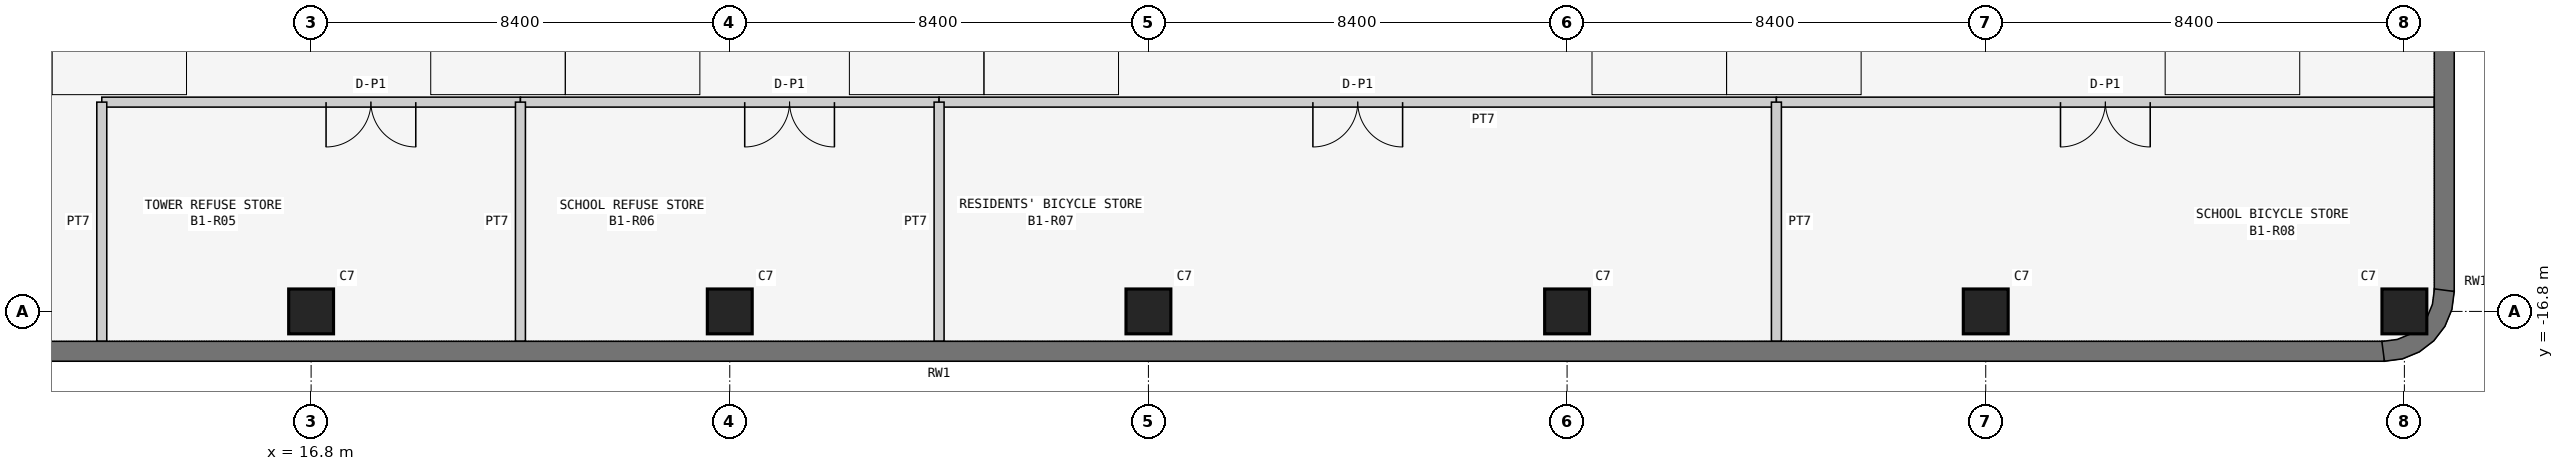
"""IFC4 building model, lengths in metres.
Left out: names, types, materials, properties, quantities, classifications, styles, units other than length and angle.
Written with IfcOpenShell. Run it as: python <this file> out.ifc"""

import sys

from ifc_helpers import new_model, si_unit, direction, frame, frame_2d, origin, origin_2d, place, context, subcontext, project, spatial, polyline, rectangle, outline, extrude, element, fill, save


model = new_model("IFC4")
c1 = context("Model", 3, precision=1e-05, world=origin(), true_north=direction((0.0, 1.0)))
c2 = subcontext(c1, "Body", "Model", "MODEL_VIEW")
j1 = project(units=[si_unit("LENGTHUNIT", "METRE"), si_unit("PLANEANGLEUNIT", "RADIAN")], contexts=[c1])
p1 = place(None, origin())
s1 = spatial("IfcSite", under=j1, at=p1, CompositionType="ELEMENT")
p2 = place(p1, origin())
s2 = spatial("IfcBuilding", under=s1, at=p2, CompositionType="ELEMENT")
p3 = place(p2, frame((0.0, 0.0, -3.6)))
s3 = spatial("IfcBuildingStorey", under=s2, at=p3, CompositionType="ELEMENT", Elevation=-3.6)
for number, where, z_axis, x_axis in (
    (1, (16.8, -16.8, 0.0), (0.0, 0.0, 1.0), (1.0, 0.0, 0.0)),
    (2, (25.2, -16.8, 0.0), (0.0, 0.0, 1.0), (1.0, 0.0, 0.0)),
    (3, (33.6, -16.8, 0.0), (0.0, 0.0, 1.0), (1.0, 0.0, 0.0)),
    (4, (42.0, -16.8, 0.0), (0.0, 0.0, 1.0), (1.0, 0.0, 0.0)),
    (5, (50.4, -16.8, 0.0), (0.0, 0.0, 1.0), (1.0, 0.0, 0.0)),
    (6, (58.8, -16.8, 0.0), (0.0, 0.0, 1.0), (1.0, 0.0, 0.0)),
):
    element("IfcColumn", number, at=place(p3, frame(where, z_axis=z_axis, x_axis=x_axis)), inside=s3, PredefinedType="COLUMN", context=c2, shape_type="SweptSolid", body=[
        extrude(rectangle(XDim=0.9, YDim=0.9, at=origin_2d()), origin(), (0.0, 0.0, 1.0), 3.6),
    ])
p4 = place(p3, frame((59.6, -16.4, 0.0), z_axis=(0.0, 0.0, 1.0), x_axis=(0.0, 1.0, 0.0)))
e7 = element("IfcWall", 7, at=p4, inside=s3, PredefinedType="SOLIDWALL", context=c2, shape_type="SweptSolid", body=[
    extrude(rectangle(XDim=74.8, YDim=0.4, at=frame_2d((37.4, 0.0))), origin(), (0.0, 0.0, 1.0), 3.6),
])
p5 = place(p3, frame((0.4, -17.6, 0.0), z_axis=(0.0, 0.0, 1.0), x_axis=(1.0, 0.0, 0.0)))
e8 = element("IfcWall", 8, at=p5, inside=s3, PredefinedType="SOLIDWALL", context=c2, shape_type="SweptSolid", body=[
    extrude(rectangle(XDim=58.0, YDim=0.4, at=frame_2d((29.0, 0.0))), origin(), (0.0, 0.0, 1.0), 3.6),
])
p6 = place(p3, origin())
e9 = element("IfcWall", 9, at=p6, inside=s3, PredefinedType="SOLIDWALL", context=c2, shape_type="SweptSolid", body=[
    extrude(outline(polyline([(59.8, -16.4), (59.4, -16.347), (59.4, -16.374), (59.363, -16.658), (59.263, -16.898), (59.104, -17.104), (58.898, -17.263), (58.658, -17.363), (58.374, -17.4), (58.347, -17.4), (58.4, -17.8), (58.762, -17.752), (59.1, -17.612), (59.39, -17.39), (59.612, -17.1), (59.752, -16.762), (59.8, -16.4)])), origin(), (0.0, 0.0, 1.0), 3.6),
])
p7 = place(p3, frame((21.0, -12.6, 0.0), z_axis=(0.0, 0.0, 1.0), x_axis=(-1.0, 0.0, 0.0)))
e10 = element("IfcWall", 10, at=p7, inside=s3, PredefinedType="PARTITIONING", context=c2, shape_type="SweptSolid", body=[
    extrude(rectangle(XDim=8.4, YDim=0.2, at=frame_2d((4.2, 0.0))), origin(), (0.0, 0.0, 1.0), 3.3),
])
p8 = place(p7, frame((2.1, 0.0, 0.0)))
e11 = element("IfcOpeningElement", 11, at=p8, cuts=e10, PredefinedType="OPENING", context=c2, shape_type="SweptSolid", body=[
    extrude(rectangle(XDim=1.8, YDim=2.4, at=frame_2d((0.9, 1.2))), frame((0.0, 0.11, 0.0), z_axis=(0.0, -1.0, 0.0), x_axis=(1.0, 0.0, 0.0)), (0.0, 0.0, 1.0), 0.22),
])
p9 = place(p3, frame((12.6, -12.6, 0.0), z_axis=(0.0, 0.0, 1.0), x_axis=(0.0, -1.0, 0.0)))
e12 = element("IfcWall", 12, at=p9, inside=s3, PredefinedType="PARTITIONING", context=c2, shape_type="SweptSolid", body=[
    extrude(rectangle(XDim=4.8, YDim=0.2, at=frame_2d((2.4, 0.0))), origin(), (0.0, 0.0, 1.0), 2.688),
])
p10 = place(p3, frame((29.4, -12.6, 0.0), z_axis=(0.0, 0.0, 1.0), x_axis=(-1.0, 0.0, 0.0)))
e13 = element("IfcWall", 13, at=p10, inside=s3, PredefinedType="PARTITIONING", context=c2, shape_type="SweptSolid", body=[
    extrude(rectangle(XDim=8.4, YDim=0.2, at=frame_2d((4.2, 0.0))), origin(), (0.0, 0.0, 1.0), 3.3),
])
p11 = place(p10, frame((2.1, 0.0, 0.0)))
e14 = element("IfcOpeningElement", 14, at=p11, cuts=e13, PredefinedType="OPENING", context=c2, shape_type="SweptSolid", body=[
    extrude(rectangle(XDim=1.8, YDim=2.4, at=frame_2d((0.9, 1.2))), frame((0.0, 0.11, 0.0), z_axis=(0.0, -1.0, 0.0), x_axis=(1.0, 0.0, 0.0)), (0.0, 0.0, 1.0), 0.22),
])
p12 = place(p3, frame((46.2, -12.6, 0.0), z_axis=(0.0, 0.0, 1.0), x_axis=(-1.0, 0.0, 0.0)))
e15 = element("IfcWall", 15, at=p12, inside=s3, PredefinedType="PARTITIONING", context=c2, shape_type="SweptSolid", body=[
    extrude(rectangle(XDim=16.8, YDim=0.2, at=frame_2d((8.4, 0.0))), origin(), (0.0, 0.0, 1.0), 3.3),
])
p13 = place(p12, frame((7.5, 0.0, 0.0)))
e16 = element("IfcOpeningElement", 16, at=p13, cuts=e15, PredefinedType="OPENING", context=c2, shape_type="SweptSolid", body=[
    extrude(rectangle(XDim=1.8, YDim=2.4, at=frame_2d((0.9, 1.2))), frame((0.0, 0.11, 0.0), z_axis=(0.0, -1.0, 0.0), x_axis=(1.0, 0.0, 0.0)), (0.0, 0.0, 1.0), 0.22),
])
p14 = place(p3, frame((59.4, -12.6, 0.0), z_axis=(0.0, 0.0, 1.0), x_axis=(-1.0, 0.0, 0.0)))
e17 = element("IfcWall", 17, at=p14, inside=s3, PredefinedType="PARTITIONING", context=c2, shape_type="SweptSolid", body=[
    extrude(rectangle(XDim=13.2, YDim=0.2, at=frame_2d((6.6, 0.0))), origin(), (0.0, 0.0, 1.0), 3.3),
])
p15 = place(p14, frame((5.7, 0.0, 0.0)))
e18 = element("IfcOpeningElement", 18, at=p15, cuts=e17, PredefinedType="OPENING", context=c2, shape_type="SweptSolid", body=[
    extrude(rectangle(XDim=1.8, YDim=2.4, at=frame_2d((0.9, 1.2))), frame((0.0, 0.11, 0.0), z_axis=(0.0, -1.0, 0.0), x_axis=(1.0, 0.0, 0.0)), (0.0, 0.0, 1.0), 0.22),
])
for number, where, z_axis, x_axis in (
    (19, (21.0, -12.6, 0.0), (0.0, 0.0, 1.0), (0.0, -1.0, 0.0)),
    (20, (29.4, -12.6, 0.0), (0.0, 0.0, 1.0), (0.0, -1.0, 0.0)),
    (21, (46.2, -12.6, 0.0), (0.0, 0.0, 1.0), (0.0, -1.0, 0.0)),
):
    element("IfcWall", number, at=place(p3, frame(where, z_axis=z_axis, x_axis=x_axis)), inside=s3, PredefinedType="PARTITIONING", context=c2, shape_type="SweptSolid", body=[
        extrude(rectangle(XDim=4.8, YDim=0.2, at=frame_2d((2.4, 0.0))), origin(), (0.0, 0.0, 1.0), 2.688),
    ])
p16 = place(p8, origin())
e22 = element("IfcDoor", 22, at=p16, inside=s3, OperationType="DOUBLE_DOOR_SINGLE_SWING", PredefinedType="DOOR", context=c2, shape_type="SweptSolid", body=[
    extrude(rectangle(XDim=1.8, YDim=2.4, at=frame_2d((0.9, 1.2))), frame((0.0, 0.025, 0.0), z_axis=(0.0, -1.0, 0.0), x_axis=(1.0, 0.0, 0.0)), (0.0, 0.0, 1.0), 0.05),
])
fill(e11, e22)
p17 = place(p11, origin())
e23 = element("IfcDoor", 23, at=p17, inside=s3, OperationType="DOUBLE_DOOR_SINGLE_SWING", PredefinedType="DOOR", context=c2, shape_type="SweptSolid", body=[
    extrude(rectangle(XDim=1.8, YDim=2.4, at=frame_2d((0.9, 1.2))), frame((0.0, 0.025, 0.0), z_axis=(0.0, -1.0, 0.0), x_axis=(1.0, 0.0, 0.0)), (0.0, 0.0, 1.0), 0.05),
])
fill(e14, e23)
p18 = place(p13, origin())
e24 = element("IfcDoor", 24, at=p18, inside=s3, OperationType="DOUBLE_DOOR_SINGLE_SWING", PredefinedType="DOOR", context=c2, shape_type="SweptSolid", body=[
    extrude(rectangle(XDim=1.8, YDim=2.4, at=frame_2d((0.9, 1.2))), frame((0.0, 0.025, 0.0), z_axis=(0.0, -1.0, 0.0), x_axis=(1.0, 0.0, 0.0)), (0.0, 0.0, 1.0), 0.05),
])
fill(e16, e24)
p19 = place(p15, origin())
e25 = element("IfcDoor", 25, at=p19, inside=s3, OperationType="DOUBLE_DOOR_SINGLE_SWING", PredefinedType="DOOR", context=c2, shape_type="SweptSolid", body=[
    extrude(rectangle(XDim=1.8, YDim=2.4, at=frame_2d((0.9, 1.2))), frame((0.0, 0.025, 0.0), z_axis=(0.0, -1.0, 0.0), x_axis=(1.0, 0.0, 0.0)), (0.0, 0.0, 1.0), 0.05),
])
fill(e18, e25)
save(model, sys.argv[1])
